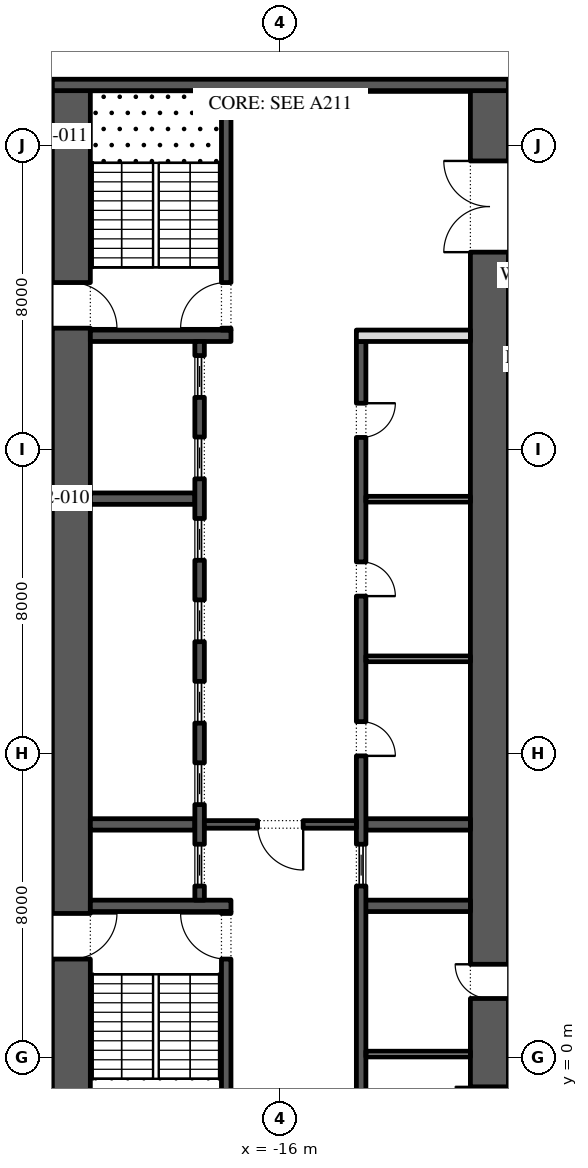
"""IFC4 building model, lengths in metres.
Left out: names, types, materials, properties, quantities, classifications, styles, units other than length and angle.
Written with IfcOpenShell. Run it as: python <this file> out.ifc"""

import sys

from ifc_helpers import new_model, si_unit, direction, frame, frame_2d, origin, place, context, subcontext, project, spatial, rectangle, extrude, element, fill, save


model = new_model("IFC4")
c1 = context("Model", 3, precision=1e-05, world=origin(), true_north=direction((0.0, 1.0)))
c2 = subcontext(c1, "Body", "Model", "MODEL_VIEW")
j1 = project(units=[si_unit("LENGTHUNIT", "METRE"), si_unit("PLANEANGLEUNIT", "RADIAN")], contexts=[c1])
p1 = place(None, origin())
s1 = spatial("IfcSite", under=j1, at=p1, CompositionType="ELEMENT")
p2 = place(p1, origin())
s2 = spatial("IfcBuilding", under=s1, at=p2, CompositionType="ELEMENT")
p3 = place(p2, frame((0.0, 0.0, 43.8)))
s3 = spatial("IfcBuildingStorey", under=s2, at=p3, CompositionType="ELEMENT", Elevation=43.8)
p4 = place(p3, frame((-21.5, -2.45, 0.0), z_axis=(0.0, 0.0, 1.0), x_axis=(0.0, 1.0, 0.0)))
e1 = element("IfcWall", 1, at=p4, inside=s3, PredefinedType="SHEAR", context=c2, shape_type="SweptSolid", body=[
    extrude(rectangle(XDim=27.9, YDim=1.0, at=frame_2d((13.95, 0.0))), origin(), (0.0, 0.0, 1.0), 4.0),
])
p5 = place(p4, frame((5.05, 0.0, 0.0)))
e2 = element("IfcOpeningElement", 2, at=p5, cuts=e1, PredefinedType="OPENING", context=c2, shape_type="SweptSolid", body=[
    extrude(rectangle(XDim=1.2, YDim=2.1, at=frame_2d((0.6, 1.05))), frame((0.0, 0.51, 0.0), z_axis=(0.0, -1.0, 0.0), x_axis=(1.0, 0.0, 0.0)), (0.0, 0.0, 1.0), 1.02),
])
p6 = place(p4, frame((21.65, 0.0, 0.0)))
e3 = element("IfcOpeningElement", 3, at=p6, cuts=e1, PredefinedType="OPENING", context=c2, shape_type="SweptSolid", body=[
    extrude(rectangle(XDim=1.2, YDim=2.1, at=frame_2d((0.6, 1.05))), frame((0.0, 0.51, 0.0), z_axis=(0.0, -1.0, 0.0), x_axis=(1.0, 0.0, 0.0)), (0.0, 0.0, 1.0), 1.02),
])
p7 = place(p3, frame((-10.5, -2.45, 0.0), z_axis=(0.0, 0.0, 1.0), x_axis=(0.0, 1.0, 0.0)))
e4 = element("IfcWall", 4, at=p7, inside=s3, PredefinedType="SHEAR", context=c2, shape_type="SweptSolid", body=[
    extrude(rectangle(XDim=27.9, YDim=1.0, at=frame_2d((13.95, 0.0))), origin(), (0.0, 0.0, 1.0), 4.0),
])
p8 = place(p7, frame((23.65, 0.0, 0.0)))
e5 = element("IfcOpeningElement", 5, at=p8, cuts=e4, PredefinedType="OPENING", context=c2, shape_type="SweptSolid", body=[
    extrude(rectangle(XDim=2.4, YDim=2.1, at=frame_2d((1.2, 1.05))), frame((0.0, 0.51, 0.0), z_axis=(0.0, -1.0, 0.0), x_axis=(1.0, 0.0, 0.0)), (0.0, 0.0, 1.0), 1.02),
])
p9 = place(p7, frame((0.788, 0.0, 0.0)))
e6 = element("IfcOpeningElement", 6, at=p9, cuts=e4, PredefinedType="OPENING", context=c2, shape_type="SweptSolid", body=[
    extrude(rectangle(XDim=0.9, YDim=2.1, at=frame_2d((0.45, 1.05))), frame((0.0, 0.51, 0.0), z_axis=(0.0, -1.0, 0.0), x_axis=(1.0, 0.0, 0.0)), (0.0, 0.0, 1.0), 1.02),
])
p10 = place(p7, frame((4.012, 0.0, 0.0)))
e7 = element("IfcOpeningElement", 7, at=p10, cuts=e4, PredefinedType="OPENING", context=c2, shape_type="SweptSolid", body=[
    extrude(rectangle(XDim=0.9, YDim=2.1, at=frame_2d((0.45, 1.05))), frame((0.0, 0.51, 0.0), z_axis=(0.0, -1.0, 0.0), x_axis=(1.0, 0.0, 0.0)), (0.0, 0.0, 1.0), 1.02),
])
p11 = place(p3, frame((-22.0, 25.6, 0.0), z_axis=(0.0, 0.0, 1.0), x_axis=(1.0, 0.0, 0.0)))
e8 = element("IfcWall", 8, at=p11, inside=s3, PredefinedType="SHEAR", context=c2, shape_type="SweptSolid", body=[
    extrude(rectangle(XDim=12.0, YDim=0.3, at=frame_2d((6.0, 0.0))), origin(), (0.0, 0.0, 1.0), 4.0),
])
p12 = place(p3, frame((-21.0, 4.0, 0.0), z_axis=(0.0, 0.0, 1.0), x_axis=(1.0, 0.0, 0.0)))
e9 = element("IfcWall", 9, at=p12, inside=s3, PredefinedType="SHEAR", context=c2, shape_type="SweptSolid", body=[
    extrude(rectangle(XDim=3.7, YDim=0.3, at=frame_2d((1.85, 0.0))), origin(), (0.0, 0.0, 1.0), 4.0),
])
p13 = place(p3, frame((-17.425, -2.45, 0.0), z_axis=(0.0, 0.0, 1.0), x_axis=(0.0, 1.0, 0.0)))
e10 = element("IfcWall", 10, at=p13, inside=s3, PredefinedType="SHEAR", context=c2, shape_type="SweptSolid", body=[
    extrude(rectangle(XDim=6.3, YDim=0.25, at=frame_2d((3.15, 0.0))), origin(), (0.0, 0.0, 1.0), 4.0),
])
p14 = place(p13, frame((5.05, 0.0, 0.0)))
e11 = element("IfcOpeningElement", 11, at=p14, cuts=e10, PredefinedType="OPENING", context=c2, shape_type="SweptSolid", body=[
    extrude(rectangle(XDim=1.2, YDim=2.1, at=frame_2d((0.6, 1.05))), frame((0.0, 0.135, 0.0), z_axis=(0.0, -1.0, 0.0), x_axis=(1.0, 0.0, 0.0)), (0.0, 0.0, 1.0), 0.27),
])
p15 = place(p3, frame((-21.0, 19.0, 0.0), z_axis=(0.0, 0.0, 1.0), x_axis=(1.0, 0.0, 0.0)))
e12 = element("IfcWall", 12, at=p15, inside=s3, PredefinedType="SHEAR", context=c2, shape_type="SweptSolid", body=[
    extrude(rectangle(XDim=3.7, YDim=0.3, at=frame_2d((1.85, 0.0))), origin(), (0.0, 0.0, 1.0), 4.0),
])
p16 = place(p3, frame((-17.425, 19.15, 0.0), z_axis=(0.0, 0.0, 1.0), x_axis=(0.0, 1.0, 0.0)))
e13 = element("IfcWall", 13, at=p16, inside=s3, PredefinedType="SHEAR", context=c2, shape_type="SweptSolid", body=[
    extrude(rectangle(XDim=6.3, YDim=0.25, at=frame_2d((3.15, 0.0))), origin(), (0.0, 0.0, 1.0), 4.0),
])
p17 = place(p16, frame((0.05, 0.0, 0.0)))
e14 = element("IfcOpeningElement", 14, at=p17, cuts=e13, PredefinedType="OPENING", context=c2, shape_type="SweptSolid", body=[
    extrude(rectangle(XDim=1.2, YDim=2.1, at=frame_2d((0.6, 1.05))), frame((0.0, 0.135, 0.0), z_axis=(0.0, -1.0, 0.0), x_axis=(1.0, 0.0, 0.0)), (0.0, 0.0, 1.0), 0.27),
])
for number, where, z_axis, x_axis in (
    (15, (-21.0, 6.143, 0.0), (0.0, 0.0, 1.0), (1.0, 0.0, 0.0)),
    (16, (-21.0, 14.714, 0.0), (0.0, 0.0, 1.0), (1.0, 0.0, 0.0)),
):
    element("IfcWall", number, at=place(p3, frame(where, z_axis=z_axis, x_axis=x_axis)), inside=s3, PredefinedType="SHEAR", context=c2, shape_type="SweptSolid", body=[
        extrude(rectangle(XDim=2.75, YDim=0.3, at=frame_2d((1.375, 0.0))), origin(), (0.0, 0.0, 1.0), 4.0),
    ])
p18 = place(p3, frame((-18.125, 4.15, 0.0), z_axis=(0.0, 0.0, 1.0), x_axis=(0.0, 1.0, 0.0)))
e17 = element("IfcWall", 17, at=p18, inside=s3, PredefinedType="SHEAR", context=c2, shape_type="SweptSolid", body=[
    extrude(rectangle(XDim=14.7, YDim=0.25, at=frame_2d((7.35, 0.0))), origin(), (0.0, 0.0, 1.0), 4.0),
])
p19 = place(p18, frame((0.371, 0.0, 0.0)))
e18 = element("IfcOpeningElement", 18, at=p19, cuts=e17, PredefinedType="OPENING", context=c2, shape_type="SweptSolid", body=[
    extrude(rectangle(XDim=1.1, YDim=2.1, at=frame_2d((0.55, 1.05))), frame((0.0, 0.135, 0.0), z_axis=(0.0, -1.0, 0.0), x_axis=(1.0, 0.0, 0.0)), (0.0, 0.0, 1.0), 0.27),
])
p20 = place(p18, frame((2.514, 0.0, 0.0)))
e19 = element("IfcOpeningElement", 19, at=p20, cuts=e17, PredefinedType="OPENING", context=c2, shape_type="SweptSolid", body=[
    extrude(rectangle(XDim=1.1, YDim=2.1, at=frame_2d((0.55, 1.05))), frame((0.0, 0.135, 0.0), z_axis=(0.0, -1.0, 0.0), x_axis=(1.0, 0.0, 0.0)), (0.0, 0.0, 1.0), 0.27),
])
p21 = place(p18, frame((4.657, 0.0, 0.0)))
e20 = element("IfcOpeningElement", 20, at=p21, cuts=e17, PredefinedType="OPENING", context=c2, shape_type="SweptSolid", body=[
    extrude(rectangle(XDim=1.1, YDim=2.1, at=frame_2d((0.55, 1.05))), frame((0.0, 0.135, 0.0), z_axis=(0.0, -1.0, 0.0), x_axis=(1.0, 0.0, 0.0)), (0.0, 0.0, 1.0), 0.27),
])
p22 = place(p18, frame((6.8, 0.0, 0.0)))
e21 = element("IfcOpeningElement", 21, at=p22, cuts=e17, PredefinedType="OPENING", context=c2, shape_type="SweptSolid", body=[
    extrude(rectangle(XDim=1.1, YDim=2.1, at=frame_2d((0.55, 1.05))), frame((0.0, 0.135, 0.0), z_axis=(0.0, -1.0, 0.0), x_axis=(1.0, 0.0, 0.0)), (0.0, 0.0, 1.0), 0.27),
])
p23 = place(p18, frame((8.943, 0.0, 0.0)))
e22 = element("IfcOpeningElement", 22, at=p23, cuts=e17, PredefinedType="OPENING", context=c2, shape_type="SweptSolid", body=[
    extrude(rectangle(XDim=1.1, YDim=2.1, at=frame_2d((0.55, 1.05))), frame((0.0, 0.135, 0.0), z_axis=(0.0, -1.0, 0.0), x_axis=(1.0, 0.0, 0.0)), (0.0, 0.0, 1.0), 0.27),
])
p24 = place(p18, frame((11.086, 0.0, 0.0)))
e23 = element("IfcOpeningElement", 23, at=p24, cuts=e17, PredefinedType="OPENING", context=c2, shape_type="SweptSolid", body=[
    extrude(rectangle(XDim=1.1, YDim=2.1, at=frame_2d((0.55, 1.05))), frame((0.0, 0.135, 0.0), z_axis=(0.0, -1.0, 0.0), x_axis=(1.0, 0.0, 0.0)), (0.0, 0.0, 1.0), 0.27),
])
p25 = place(p18, frame((13.229, 0.0, 0.0)))
e24 = element("IfcOpeningElement", 24, at=p25, cuts=e17, PredefinedType="OPENING", context=c2, shape_type="SweptSolid", body=[
    extrude(rectangle(XDim=1.1, YDim=2.1, at=frame_2d((0.55, 1.05))), frame((0.0, 0.135, 0.0), z_axis=(0.0, -1.0, 0.0), x_axis=(1.0, 0.0, 0.0)), (0.0, 0.0, 1.0), 0.27),
])
p26 = place(p3, frame((-14.0, 4.0, 0.0), z_axis=(0.0, 0.0, 1.0), x_axis=(1.0, 0.0, 0.0)))
e25 = element("IfcWall", 25, at=p26, inside=s3, PredefinedType="SHEAR", context=c2, shape_type="SweptSolid", body=[
    extrude(rectangle(XDim=3.0, YDim=0.3, at=frame_2d((1.5, 0.0))), origin(), (0.0, 0.0, 1.0), 4.0),
])
p27 = place(p3, frame((-13.75, 6.143, 0.0), z_axis=(0.0, 0.0, 1.0), x_axis=(1.0, 0.0, 0.0)))
e26 = element("IfcWall", 26, at=p27, inside=s3, PredefinedType="SHEAR", context=c2, shape_type="SweptSolid", body=[
    extrude(rectangle(XDim=2.75, YDim=0.3, at=frame_2d((1.375, 0.0))), origin(), (0.0, 0.0, 1.0), 4.0),
])
p28 = place(p3, frame((-13.875, -2.45, 0.0), z_axis=(0.0, 0.0, 1.0), x_axis=(0.0, 1.0, 0.0)))
e27 = element("IfcWall", 27, at=p28, inside=s3, PredefinedType="SHEAR", context=c2, shape_type="SweptSolid", body=[
    extrude(rectangle(XDim=21.3, YDim=0.25, at=frame_2d((10.65, 0.0))), origin(), (0.0, 0.0, 1.0), 4.0),
])
p29 = place(p28, frame((10.396, 0.0, 0.0)))
e28 = element("IfcOpeningElement", 28, at=p29, cuts=e27, PredefinedType="OPENING", context=c2, shape_type="SweptSolid", body=[
    extrude(rectangle(XDim=0.9, YDim=2.1, at=frame_2d((0.45, 1.05))), frame((0.0, 0.135, 0.0), z_axis=(0.0, -1.0, 0.0), x_axis=(1.0, 0.0, 0.0)), (0.0, 0.0, 1.0), 0.27),
])
p30 = place(p28, frame((14.6, 0.0, 0.0)))
e29 = element("IfcOpeningElement", 29, at=p30, cuts=e27, PredefinedType="OPENING", context=c2, shape_type="SweptSolid", body=[
    extrude(rectangle(XDim=0.9, YDim=2.1, at=frame_2d((0.45, 1.05))), frame((0.0, 0.135, 0.0), z_axis=(0.0, -1.0, 0.0), x_axis=(1.0, 0.0, 0.0)), (0.0, 0.0, 1.0), 0.27),
])
p31 = place(p28, frame((18.775, 0.0, 0.0)))
e30 = element("IfcOpeningElement", 30, at=p31, cuts=e27, PredefinedType="OPENING", context=c2, shape_type="SweptSolid", body=[
    extrude(rectangle(XDim=0.9, YDim=2.1, at=frame_2d((0.45, 1.05))), frame((0.0, 0.135, 0.0), z_axis=(0.0, -1.0, 0.0), x_axis=(1.0, 0.0, 0.0)), (0.0, 0.0, 1.0), 0.27),
])
p32 = place(p28, frame((6.971, 0.0, 0.0)))
e31 = element("IfcOpeningElement", 31, at=p32, cuts=e27, PredefinedType="OPENING", context=c2, shape_type="SweptSolid", body=[
    extrude(rectangle(XDim=1.1, YDim=2.1, at=frame_2d((0.55, 1.05))), frame((0.0, 0.135, 0.0), z_axis=(0.0, -1.0, 0.0), x_axis=(1.0, 0.0, 0.0)), (0.0, 0.0, 1.0), 0.27),
])
p33 = place(p3, frame((-14.0, 19.0, 0.0), z_axis=(0.0, 0.0, 1.0), x_axis=(1.0, 0.0, 0.0)))
e32 = element("IfcWall", 32, at=p33, inside=s3, PredefinedType="PARTITIONING", context=c2, shape_type="SweptSolid", body=[
    extrude(rectangle(XDim=3.0, YDim=0.3, at=frame_2d((1.5, 0.0))), origin(), (0.0, 0.0, 1.0), 4.0),
])
for number, where, z_axis, x_axis in (
    (33, (-13.75, 10.5, 0.0), (0.0, 0.0, 1.0), (1.0, 0.0, 0.0)),
    (34, (-13.75, 14.7, 0.0), (0.0, 0.0, 1.0), (1.0, 0.0, 0.0)),
):
    element("IfcWall", number, at=place(p3, frame(where, z_axis=z_axis, x_axis=x_axis)), inside=s3, PredefinedType="PARTITIONING", context=c2, shape_type="SweptSolid", body=[
        extrude(rectangle(XDim=2.75, YDim=0.15, at=frame_2d((1.375, 0.0))), origin(), (0.0, 0.0, 1.0), 4.0),
    ])
p34 = place(p3, frame((-18.0, 6.143, 0.0), z_axis=(0.0, 0.0, 1.0), x_axis=(1.0, 0.0, 0.0)))
e35 = element("IfcWall", 35, at=p34, inside=s3, PredefinedType="SHEAR", context=c2, shape_type="SweptSolid", body=[
    extrude(rectangle(XDim=4.0, YDim=0.2, at=frame_2d((2.0, 0.0))), origin(), (0.0, 0.0, 1.0), 4.0),
])
p35 = place(p34, frame((1.4, 0.0, 0.0)))
e36 = element("IfcOpeningElement", 36, at=p35, cuts=e35, PredefinedType="OPENING", context=c2, shape_type="SweptSolid", body=[
    extrude(rectangle(XDim=1.2, YDim=2.1, at=frame_2d((0.6, 1.05))), frame((0.0, 0.11, 0.0), z_axis=(0.0, -1.0, 0.0), x_axis=(1.0, 0.0, 0.0)), (0.0, 0.0, 1.0), 0.22),
])
p36 = place(p3, frame((-13.75, 0.1, 0.0), z_axis=(0.0, 0.0, 1.0), x_axis=(1.0, 0.0, 0.0)))
e37 = element("IfcWall", 37, at=p36, inside=s3, PredefinedType="PARTITIONING", context=c2, shape_type="SweptSolid", body=[
    extrude(rectangle(XDim=2.75, YDim=0.15, at=frame_2d((1.375, 0.0))), origin(), (0.0, 0.0, 1.0), 4.0),
])
p37 = place(p3, frame((-10.0, 19.0, 0.0), z_axis=(0.0, 0.0, 1.0), x_axis=(1.0, 0.0, 0.0)))
e38 = element("IfcWall", 38, at=p37, inside=s3, PredefinedType="PARTITIONING", context=c2, shape_type="SweptSolid", body=[
    extrude(rectangle(XDim=1.515, YDim=0.15, at=frame_2d((0.757, 0.0))), origin(), (0.0, 0.0, 1.0), 4.0),
])
p38 = place(p37, frame((0.258, 0.0, 0.0)))
e39 = element("IfcOpeningElement", 39, at=p38, cuts=e38, PredefinedType="OPENING", context=c2, shape_type="SweptSolid", body=[
    extrude(rectangle(XDim=1.0, YDim=2.1, at=frame_2d((0.5, 1.05))), frame((0.0, 0.085, 0.0), z_axis=(0.0, -1.0, 0.0), x_axis=(1.0, 0.0, 0.0)), (0.0, 0.0, 1.0), 0.17),
])
p39 = place(p19, origin())
e40 = element("IfcDoor", 40, at=p39, inside=s3, OperationType="SLIDING_TO_LEFT", PredefinedType="DOOR", context=c2, shape_type="SweptSolid", body=[
    extrude(rectangle(XDim=1.1, YDim=2.1, at=frame_2d((0.55, 1.05))), frame((0.0, 0.025, 0.0), z_axis=(0.0, -1.0, 0.0), x_axis=(1.0, 0.0, 0.0)), (0.0, 0.0, 1.0), 0.05),
])
fill(e18, e40)
p40 = place(p20, origin())
e41 = element("IfcDoor", 41, at=p40, inside=s3, OperationType="SLIDING_TO_LEFT", PredefinedType="DOOR", context=c2, shape_type="SweptSolid", body=[
    extrude(rectangle(XDim=1.1, YDim=2.1, at=frame_2d((0.55, 1.05))), frame((0.0, 0.025, 0.0), z_axis=(0.0, -1.0, 0.0), x_axis=(1.0, 0.0, 0.0)), (0.0, 0.0, 1.0), 0.05),
])
fill(e19, e41)
p41 = place(p21, origin())
e42 = element("IfcDoor", 42, at=p41, inside=s3, OperationType="SLIDING_TO_LEFT", PredefinedType="DOOR", context=c2, shape_type="SweptSolid", body=[
    extrude(rectangle(XDim=1.1, YDim=2.1, at=frame_2d((0.55, 1.05))), frame((0.0, 0.025, 0.0), z_axis=(0.0, -1.0, 0.0), x_axis=(1.0, 0.0, 0.0)), (0.0, 0.0, 1.0), 0.05),
])
fill(e20, e42)
p42 = place(p22, origin())
e43 = element("IfcDoor", 43, at=p42, inside=s3, OperationType="SLIDING_TO_LEFT", PredefinedType="DOOR", context=c2, shape_type="SweptSolid", body=[
    extrude(rectangle(XDim=1.1, YDim=2.1, at=frame_2d((0.55, 1.05))), frame((0.0, 0.025, 0.0), z_axis=(0.0, -1.0, 0.0), x_axis=(1.0, 0.0, 0.0)), (0.0, 0.0, 1.0), 0.05),
])
fill(e21, e43)
p43 = place(p23, origin())
e44 = element("IfcDoor", 44, at=p43, inside=s3, OperationType="SLIDING_TO_LEFT", PredefinedType="DOOR", context=c2, shape_type="SweptSolid", body=[
    extrude(rectangle(XDim=1.1, YDim=2.1, at=frame_2d((0.55, 1.05))), frame((0.0, 0.025, 0.0), z_axis=(0.0, -1.0, 0.0), x_axis=(1.0, 0.0, 0.0)), (0.0, 0.0, 1.0), 0.05),
])
fill(e22, e44)
p44 = place(p24, origin())
e45 = element("IfcDoor", 45, at=p44, inside=s3, OperationType="SLIDING_TO_LEFT", PredefinedType="DOOR", context=c2, shape_type="SweptSolid", body=[
    extrude(rectangle(XDim=1.1, YDim=2.1, at=frame_2d((0.55, 1.05))), frame((0.0, 0.025, 0.0), z_axis=(0.0, -1.0, 0.0), x_axis=(1.0, 0.0, 0.0)), (0.0, 0.0, 1.0), 0.05),
])
fill(e23, e45)
p45 = place(p25, origin())
e46 = element("IfcDoor", 46, at=p45, inside=s3, OperationType="SLIDING_TO_LEFT", PredefinedType="DOOR", context=c2, shape_type="SweptSolid", body=[
    extrude(rectangle(XDim=1.1, YDim=2.1, at=frame_2d((0.55, 1.05))), frame((0.0, 0.025, 0.0), z_axis=(0.0, -1.0, 0.0), x_axis=(1.0, 0.0, 0.0)), (0.0, 0.0, 1.0), 0.05),
])
fill(e24, e46)
p46 = place(p29, frame((0.9, -0.2, 0.0), z_axis=(0.0, 0.0, 1.0), x_axis=(-1.0, 0.0, 0.0)))
e47 = element("IfcDoor", 47, at=p46, inside=s3, OperationType="SINGLE_SWING_LEFT", PredefinedType="DOOR", context=c2, shape_type="SweptSolid", body=[
    extrude(rectangle(XDim=0.9, YDim=2.1, at=frame_2d((0.45, 1.05))), frame((0.0, -0.075, 0.0), z_axis=(0.0, -1.0, 0.0), x_axis=(1.0, 0.0, 0.0)), (0.0, 0.0, 1.0), 0.05),
])
fill(e28, e47)
p47 = place(p30, frame((0.9, -0.2, 0.0), z_axis=(0.0, 0.0, 1.0), x_axis=(-1.0, 0.0, 0.0)))
e48 = element("IfcDoor", 48, at=p47, inside=s3, OperationType="SINGLE_SWING_LEFT", PredefinedType="DOOR", context=c2, shape_type="SweptSolid", body=[
    extrude(rectangle(XDim=0.9, YDim=2.1, at=frame_2d((0.45, 1.05))), frame((0.0, -0.075, 0.0), z_axis=(0.0, -1.0, 0.0), x_axis=(1.0, 0.0, 0.0)), (0.0, 0.0, 1.0), 0.05),
])
fill(e29, e48)
p48 = place(p31, frame((0.9, -0.2, 0.0), z_axis=(0.0, 0.0, 1.0), x_axis=(-1.0, 0.0, 0.0)))
e49 = element("IfcDoor", 49, at=p48, inside=s3, OperationType="SINGLE_SWING_RIGHT", PredefinedType="DOOR", context=c2, shape_type="SweptSolid", body=[
    extrude(rectangle(XDim=0.9, YDim=2.1, at=frame_2d((0.45, 1.05))), frame((0.0, -0.075, 0.0), z_axis=(0.0, -1.0, 0.0), x_axis=(1.0, 0.0, 0.0)), (0.0, 0.0, 1.0), 0.05),
])
fill(e30, e49)
p49 = place(p32, origin())
e50 = element("IfcDoor", 50, at=p49, inside=s3, OperationType="SLIDING_TO_LEFT", PredefinedType="DOOR", context=c2, shape_type="SweptSolid", body=[
    extrude(rectangle(XDim=1.1, YDim=2.1, at=frame_2d((0.55, 1.05))), frame((0.0, 0.025, 0.0), z_axis=(0.0, -1.0, 0.0), x_axis=(1.0, 0.0, 0.0)), (0.0, 0.0, 1.0), 0.05),
])
fill(e31, e50)
p50 = place(p35, frame((1.2, 0.0, 0.0), z_axis=(0.0, 0.0, 1.0), x_axis=(-1.0, 0.0, 0.0)))
e51 = element("IfcDoor", 51, at=p50, inside=s3, OperationType="SINGLE_SWING_RIGHT", PredefinedType="DOOR", context=c2, shape_type="SweptSolid", body=[
    extrude(rectangle(XDim=1.2, YDim=2.1, at=frame_2d((0.6, 1.05))), frame((0.0, 0.025, 0.0), z_axis=(0.0, -1.0, 0.0), x_axis=(1.0, 0.0, 0.0)), (0.0, 0.0, 1.0), 0.05),
])
fill(e36, e51)
p51 = place(p8, origin())
e52 = element("IfcDoor", 52, at=p51, inside=s3, OperationType="DOUBLE_DOOR_SINGLE_SWING", PredefinedType="DOOR", context=c2, shape_type="SweptSolid", body=[
    extrude(rectangle(XDim=2.4, YDim=2.1, at=frame_2d((1.2, 1.05))), frame((0.0, 0.025, 0.0), z_axis=(0.0, -1.0, 0.0), x_axis=(1.0, 0.0, 0.0)), (0.0, 0.0, 1.0), 0.05),
])
fill(e5, e52)
p52 = place(p14, origin())
e53 = element("IfcDoor", 53, at=p52, inside=s3, OperationType="SINGLE_SWING_LEFT", PredefinedType="DOOR", context=c2, shape_type="SweptSolid", body=[
    extrude(rectangle(XDim=1.2, YDim=2.1, at=frame_2d((0.6, 1.05))), frame((0.0, 0.025, 0.0), z_axis=(0.0, -1.0, 0.0), x_axis=(1.0, 0.0, 0.0)), (0.0, 0.0, 1.0), 0.05),
])
fill(e11, e53)
p53 = place(p5, frame((1.2, 0.0, 0.0), z_axis=(0.0, 0.0, 1.0), x_axis=(-1.0, 0.0, 0.0)))
e54 = element("IfcDoor", 54, at=p53, inside=s3, OperationType="SINGLE_SWING_RIGHT", PredefinedType="DOOR", context=c2, shape_type="SweptSolid", body=[
    extrude(rectangle(XDim=1.2, YDim=2.1, at=frame_2d((0.6, 1.05))), frame((0.0, 0.025, 0.0), z_axis=(0.0, -1.0, 0.0), x_axis=(1.0, 0.0, 0.0)), (0.0, 0.0, 1.0), 0.05),
])
fill(e2, e54)
p54 = place(p17, origin())
e55 = element("IfcDoor", 55, at=p54, inside=s3, OperationType="SINGLE_SWING_RIGHT", PredefinedType="DOOR", context=c2, shape_type="SweptSolid", body=[
    extrude(rectangle(XDim=1.2, YDim=2.1, at=frame_2d((0.6, 1.05))), frame((0.0, 0.025, 0.0), z_axis=(0.0, -1.0, 0.0), x_axis=(1.0, 0.0, 0.0)), (0.0, 0.0, 1.0), 0.05),
])
fill(e14, e55)
p55 = place(p6, frame((1.2, 0.0, 0.0), z_axis=(0.0, 0.0, 1.0), x_axis=(-1.0, 0.0, 0.0)))
e56 = element("IfcDoor", 56, at=p55, inside=s3, OperationType="SINGLE_SWING_LEFT", PredefinedType="DOOR", context=c2, shape_type="SweptSolid", body=[
    extrude(rectangle(XDim=1.2, YDim=2.1, at=frame_2d((0.6, 1.05))), frame((0.0, 0.025, 0.0), z_axis=(0.0, -1.0, 0.0), x_axis=(1.0, 0.0, 0.0)), (0.0, 0.0, 1.0), 0.05),
])
fill(e3, e56)
p56 = place(p9, origin())
e57 = element("IfcDoor", 57, at=p56, inside=s3, OperationType="SINGLE_SWING_LEFT", PredefinedType="DOOR", context=c2, shape_type="SweptSolid", body=[
    extrude(rectangle(XDim=0.9, YDim=2.1, at=frame_2d((0.45, 1.05))), frame((0.0, 0.5, 0.0), z_axis=(0.0, -1.0, 0.0), x_axis=(1.0, 0.0, 0.0)), (0.0, 0.0, 1.0), 0.05),
])
fill(e6, e57)
p57 = place(p10, origin())
e58 = element("IfcDoor", 58, at=p57, inside=s3, OperationType="SINGLE_SWING_LEFT", PredefinedType="DOOR", context=c2, shape_type="SweptSolid", body=[
    extrude(rectangle(XDim=0.9, YDim=2.1, at=frame_2d((0.45, 1.05))), frame((0.0, 0.5, 0.0), z_axis=(0.0, -1.0, 0.0), x_axis=(1.0, 0.0, 0.0)), (0.0, 0.0, 1.0), 0.05),
])
fill(e7, e58)
save(model, sys.argv[1])
